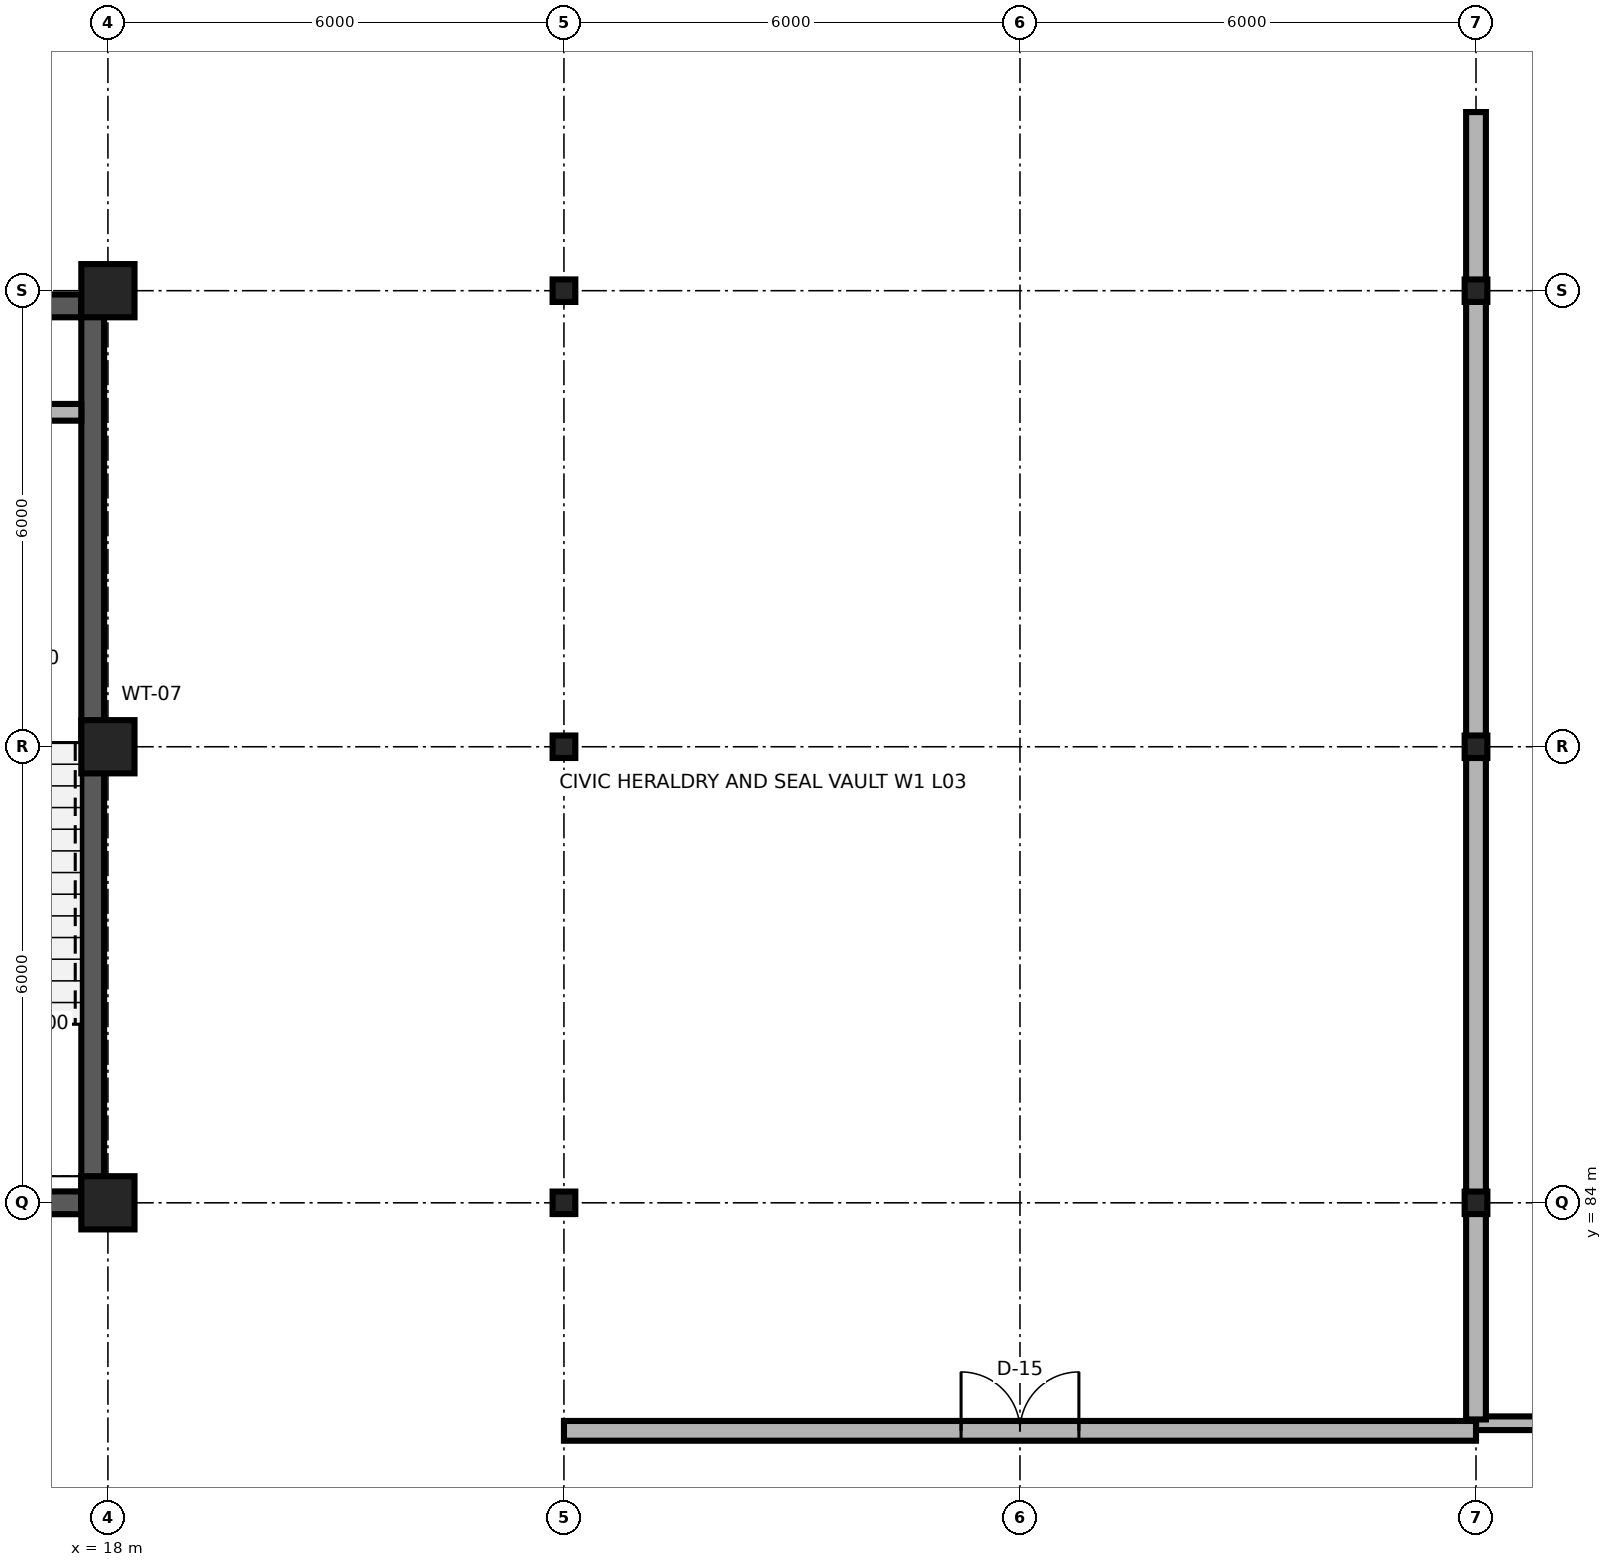
"""IFC4 building model, lengths in metres.
Left out: names, types, materials, properties, quantities, classifications, styles, units other than length and angle.
Written with IfcOpenShell. Run it as: python <this file> out.ifc"""

import sys

from ifc_helpers import new_model, si_unit, direction, frame, frame_2d, origin, origin_2d, place, context, subcontext, project, spatial, rectangle, i_section, extrude, element, fill, save


model = new_model("IFC4")
c1 = context("Model", 3, precision=1e-05, world=origin(), true_north=direction((0.0, 1.0)))
c2 = subcontext(c1, "Body", "Model", "MODEL_VIEW")
j1 = project(units=[si_unit("LENGTHUNIT", "METRE"), si_unit("PLANEANGLEUNIT", "RADIAN")], contexts=[c1])
p1 = place(None, origin())
s1 = spatial("IfcSite", under=j1, at=p1, CompositionType="ELEMENT")
p2 = place(p1, origin())
s2 = spatial("IfcBuilding", under=s1, at=p2, CompositionType="ELEMENT")
p3 = place(p2, frame((0.0, 0.0, 12.0)))
s3 = spatial("IfcBuildingStorey", under=s2, at=p3, CompositionType="ELEMENT", Elevation=12.0)
p4 = place(p3, frame((18.0, 84.0, 0.0), z_axis=(0.0, 0.0, 1.0), x_axis=(1.0, 0.0, 0.0)))
e1 = element("IfcColumn", 1, at=p4, inside=s3, PredefinedType="COLUMN", context=c2, shape_type="SweptSolid", body=[
    extrude(rectangle(XDim=0.7, YDim=0.7, at=origin_2d()), origin(), (0.0, 0.0, 1.0), 4.5),
])
for number, where, z_axis, x_axis in (
    (2, (24.0, 84.0, 0.0), (0.0, 0.0, 1.0), (1.0, 0.0, 0.0)),
    (3, (36.0, 84.0, 0.0), (0.0, 0.0, 1.0), (1.0, 0.0, 0.0)),
):
    element("IfcColumn", number, at=place(p3, frame(where, z_axis=z_axis, x_axis=x_axis)), inside=s3, PredefinedType="COLUMN", context=c2, shape_type="SweptSolid", body=[
        extrude(i_section(OverallWidth=0.299, OverallDepth=0.296, WebThickness=0.009, FlangeThickness=0.014, FilletRadius=0.018, at=origin_2d()), origin(), (0.0, 0.0, 1.0), 4.5),
    ])
p5 = place(p3, frame((18.0, 90.0, 0.0), z_axis=(0.0, 0.0, 1.0), x_axis=(1.0, 0.0, 0.0)))
e4 = element("IfcColumn", 4, at=p5, inside=s3, PredefinedType="COLUMN", context=c2, shape_type="SweptSolid", body=[
    extrude(rectangle(XDim=0.7, YDim=0.7, at=origin_2d()), origin(), (0.0, 0.0, 1.0), 4.5),
])
for number, where, z_axis, x_axis in (
    (5, (24.0, 90.0, 0.0), (0.0, 0.0, 1.0), (1.0, 0.0, 0.0)),
    (6, (36.0, 90.0, 0.0), (0.0, 0.0, 1.0), (1.0, 0.0, 0.0)),
):
    element("IfcColumn", number, at=place(p3, frame(where, z_axis=z_axis, x_axis=x_axis)), inside=s3, PredefinedType="COLUMN", context=c2, shape_type="SweptSolid", body=[
        extrude(i_section(OverallWidth=0.299, OverallDepth=0.296, WebThickness=0.009, FlangeThickness=0.014, FilletRadius=0.018, at=origin_2d()), origin(), (0.0, 0.0, 1.0), 4.5),
    ])
p6 = place(p3, frame((18.0, 96.0, 0.0), z_axis=(0.0, 0.0, 1.0), x_axis=(1.0, 0.0, 0.0)))
e7 = element("IfcColumn", 7, at=p6, inside=s3, PredefinedType="COLUMN", context=c2, shape_type="SweptSolid", body=[
    extrude(rectangle(XDim=0.7, YDim=0.7, at=origin_2d()), origin(), (0.0, 0.0, 1.0), 4.5),
])
for number, where, z_axis, x_axis in (
    (8, (24.0, 96.0, 0.0), (0.0, 0.0, 1.0), (1.0, 0.0, 0.0)),
    (9, (36.0, 96.0, 0.0), (0.0, 0.0, 1.0), (1.0, 0.0, 0.0)),
):
    element("IfcColumn", number, at=place(p3, frame(where, z_axis=z_axis, x_axis=x_axis)), inside=s3, PredefinedType="COLUMN", context=c2, shape_type="SweptSolid", body=[
        extrude(i_section(OverallWidth=0.299, OverallDepth=0.296, WebThickness=0.009, FlangeThickness=0.014, FilletRadius=0.018, at=origin_2d()), origin(), (0.0, 0.0, 1.0), 4.5),
    ])
p7 = place(p3, frame((12.35, 84.0, 0.0), z_axis=(0.0, 0.0, 1.0), x_axis=(1.0, 0.0, 0.0)))
e10 = element("IfcWall", 10, at=p7, inside=s3, PredefinedType="SHEAR", context=c2, shape_type="SweptSolid", body=[
    extrude(rectangle(XDim=5.3, YDim=0.3, at=frame_2d((2.65, 0.0))), origin(), (0.0, 0.0, 1.0), 4.22),
])
p8 = place(p7, frame((1.925, 0.0, 0.0)))
e11 = element("IfcOpeningElement", 11, at=p8, cuts=e10, PredefinedType="OPENING", context=c2, shape_type="SweptSolid", body=[
    extrude(rectangle(XDim=1.45, YDim=2.25, at=frame_2d((0.725, 1.125))), frame((0.0, 0.165, 0.0), z_axis=(0.0, -1.0, 0.0), x_axis=(1.0, 0.0, 0.0)), (0.0, 0.0, 1.0), 0.33),
])
p9 = place(p3, frame((12.35, 95.8, 0.0), z_axis=(0.0, 0.0, 1.0), x_axis=(1.0, 0.0, 0.0)))
e12 = element("IfcWall", 12, at=p9, inside=s3, PredefinedType="SHEAR", context=c2, shape_type="SweptSolid", body=[
    extrude(rectangle(XDim=5.3, YDim=0.3, at=frame_2d((2.65, 0.0))), origin(), (0.0, 0.0, 1.0), 4.22),
])
p10 = place(p3, frame((17.8, 84.0, 0.0), z_axis=(0.0, 0.0, 1.0), x_axis=(0.0, 1.0, 0.0)))
e13 = element("IfcWall", 13, at=p10, inside=s3, PredefinedType="SHEAR", context=c2, shape_type="SweptSolid", body=[
    extrude(rectangle(XDim=11.8, YDim=0.3, at=frame_2d((5.9, 0.0))), origin(), (0.0, 0.0, 1.0), 4.22),
])
p11 = place(p3, frame((16.55, 94.4, 0.0), z_axis=(0.0, 0.0, 1.0), x_axis=(1.0, 0.0, 0.0)))
e14 = element("IfcWall", 14, at=p11, inside=s3, PredefinedType="PARTITIONING", context=c2, shape_type="SweptSolid", body=[
    extrude(rectangle(XDim=1.1, YDim=0.22, at=frame_2d((0.55, 0.0))), origin(), (0.0, 0.0, 1.0), 4.22),
])
p12 = place(p3, frame((36.0, 81.1, 0.0), z_axis=(0.0, 0.0, 1.0), x_axis=(1.0, 0.0, 0.0)))
e15 = element("IfcWall", 15, at=p12, inside=s3, PredefinedType="PARTITIONING", context=c2, shape_type="SweptSolid", body=[
    extrude(rectangle(XDim=12.0, YDim=0.18, at=frame_2d((6.0, 0.0))), origin(), (0.0, 0.0, 1.0), 4.22),
])
p13 = place(p12, frame((5.125, 0.0, 0.0)))
e16 = element("IfcOpeningElement", 16, at=p13, cuts=e15, PredefinedType="OPENING", context=c2, shape_type="SweptSolid", body=[
    extrude(rectangle(XDim=1.75, YDim=2.55, at=frame_2d((0.875, 1.275))), frame((0.0, 0.105, 0.0), z_axis=(0.0, -1.0, 0.0), x_axis=(1.0, 0.0, 0.0)), (0.0, 0.0, 1.0), 0.21),
])
p14 = place(p3, frame((24.0, 81.0, 0.0), z_axis=(0.0, 0.0, 1.0), x_axis=(1.0, 0.0, 0.0)))
e17 = element("IfcWall", 17, at=p14, inside=s3, PredefinedType="PARTITIONING", context=c2, shape_type="SweptSolid", body=[
    extrude(rectangle(XDim=12.0, YDim=0.26, at=frame_2d((6.0, 0.0))), origin(), (0.0, 0.0, 1.0), 4.22),
])
p15 = place(p14, frame((5.225, 0.0, 0.0)))
e18 = element("IfcOpeningElement", 18, at=p15, cuts=e17, PredefinedType="OPENING", context=c2, shape_type="SweptSolid", body=[
    extrude(rectangle(XDim=1.55, YDim=2.3, at=frame_2d((0.775, 1.15))), frame((0.0, 0.145, 0.0), z_axis=(0.0, -1.0, 0.0), x_axis=(1.0, 0.0, 0.0)), (0.0, 0.0, 1.0), 0.29),
])
p16 = place(p3, frame((36.0, 81.15, 0.0), z_axis=(0.0, 0.0, 1.0), x_axis=(0.0, 1.0, 0.0)))
e19 = element("IfcWall", 19, at=p16, inside=s3, PredefinedType="PARTITIONING", context=c2, shape_type="SweptSolid", body=[
    extrude(rectangle(XDim=17.2, YDim=0.26, at=frame_2d((8.6, 0.0))), origin(), (0.0, 0.0, 1.0), 3.738),
])
p17 = place(p15, origin())
e20 = element("IfcDoor", 20, at=p17, inside=s3, OperationType="DOUBLE_DOOR_SINGLE_SWING", PredefinedType="DOOR", context=c2, shape_type="SweptSolid", body=[
    extrude(rectangle(XDim=1.55, YDim=2.3, at=frame_2d((0.775, 1.15))), frame((0.0, 0.025, 0.0), z_axis=(0.0, -1.0, 0.0), x_axis=(1.0, 0.0, 0.0)), (0.0, 0.0, 1.0), 0.05),
])
fill(e18, e20)
save(model, sys.argv[1])
